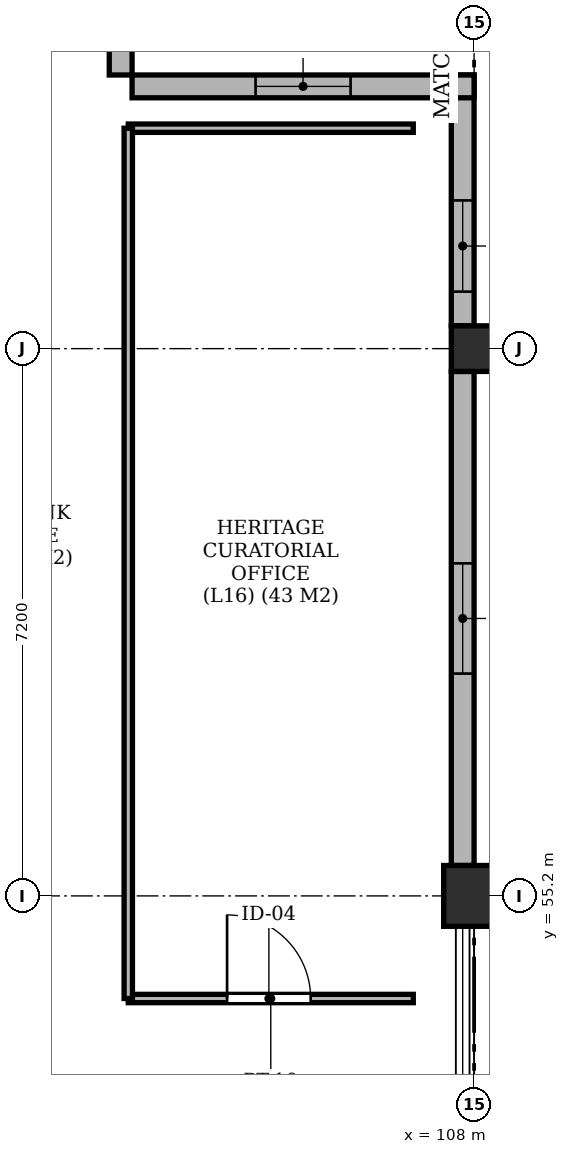
"""IFC4 building model, lengths in metres.
Left out: names, types, materials, properties, quantities, classifications, styles, units other than length and angle.
Written with IfcOpenShell. Run it as: python <this file> out.ifc"""

import sys

from ifc_helpers import new_model, si_unit, direction, frame, frame_2d, origin, origin_2d, place, context, subcontext, project, spatial, rectangle, extrude, element, fill, save


model = new_model("IFC4")
c1 = context("Model", 3, precision=1e-05, world=origin(), true_north=direction((0.0, 1.0)))
c2 = subcontext(c1, "Body", "Model", "MODEL_VIEW")
j1 = project(units=[si_unit("LENGTHUNIT", "METRE"), si_unit("PLANEANGLEUNIT", "RADIAN")], contexts=[c1])
p1 = place(None, origin())
s1 = spatial("IfcSite", under=j1, at=p1, CompositionType="ELEMENT")
p2 = place(p1, origin())
s2 = spatial("IfcBuilding", under=s1, at=p2, CompositionType="ELEMENT")
p3 = place(p2, frame((0.0, 0.0, 63.3)))
s3 = spatial("IfcBuildingStorey", under=s2, at=p3, CompositionType="ELEMENT", Elevation=63.3)
p4 = place(p3, frame((108.0, 55.2, -0.21), z_axis=(0.0, 0.0, 1.0), x_axis=(1.0, 0.0, 0.0)))
e1 = element("IfcColumn", 1, at=p4, inside=s3, PredefinedType="COLUMN", context=c2, shape_type="SweptSolid", body=[
    extrude(rectangle(XDim=0.8, YDim=0.8, at=origin_2d()), origin(), (0.0, 0.0, 1.0), 3.22),
])
p5 = place(p3, frame((108.0, 62.4, -0.21), z_axis=(0.0, 0.0, 1.0), x_axis=(1.0, 0.0, 0.0)))
e2 = element("IfcColumn", 2, at=p5, inside=s3, PredefinedType="COLUMN", context=c2, shape_type="SweptSolid", body=[
    extrude(rectangle(XDim=0.6, YDim=0.6, at=origin_2d()), origin(), (0.0, 0.0, 1.0), 3.22),
])
p6 = place(p3, frame((107.85, 55.6, 0.0), z_axis=(0.0, 0.0, 1.0), x_axis=(0.0, 1.0, 0.0)))
e3 = element("IfcWall", 3, at=p6, inside=s3, PredefinedType="SOLIDWALL", context=c2, shape_type="SweptSolid", body=[
    extrude(rectangle(XDim=6.5, YDim=0.3, at=frame_2d((3.25, 0.0))), origin(), (0.0, 0.0, 1.0), 2.53),
])
p7 = place(p6, frame((2.525, 0.0, 0.62)))
e4 = element("IfcOpeningElement", 4, at=p7, cuts=e3, PredefinedType="OPENING", context=c2, shape_type="SweptSolid", body=[
    extrude(rectangle(XDim=1.45, YDim=1.81, at=frame_2d((0.725, 0.905))), frame((0.0, 0.162, 0.0), z_axis=(0.0, -1.0, 0.0), x_axis=(1.0, 0.0, 0.0)), (0.0, 0.0, 1.0), 0.324),
])
p8 = place(p3, frame((107.85, 62.7, 0.0), z_axis=(0.0, 0.0, 1.0), x_axis=(0.0, 1.0, 0.0)))
e5 = element("IfcWall", 5, at=p8, inside=s3, PredefinedType="SOLIDWALL", context=c2, shape_type="SweptSolid", body=[
    extrude(rectangle(XDim=3.3, YDim=0.3, at=frame_2d((1.65, 0.0))), origin(), (0.0, 0.0, 1.0), 2.53),
])
p9 = place(p8, frame((0.45, 0.0, 0.62)))
e6 = element("IfcOpeningElement", 6, at=p9, cuts=e5, PredefinedType="OPENING", context=c2, shape_type="SweptSolid", body=[
    extrude(rectangle(XDim=1.2, YDim=1.65, at=frame_2d((0.6, 0.825))), frame((0.0, 0.162, 0.0), z_axis=(0.0, -1.0, 0.0), x_axis=(1.0, 0.0, 0.0)), (0.0, 0.0, 1.0), 0.324),
])
p10 = place(p3, frame((108.0, 65.85, 0.0), z_axis=(0.0, 0.0, 1.0), x_axis=(-1.0, 0.0, 0.0)))
e7 = element("IfcWall", 7, at=p10, inside=s3, PredefinedType="SOLIDWALL", context=c2, shape_type="SweptSolid", body=[
    extrude(rectangle(XDim=4.5, YDim=0.3, at=frame_2d((2.25, 0.0))), origin(), (0.0, 0.0, 1.0), 2.53),
])
p11 = place(p10, frame((1.625, 0.0, 0.62)))
e8 = element("IfcOpeningElement", 8, at=p11, cuts=e7, PredefinedType="OPENING", context=c2, shape_type="SweptSolid", body=[
    extrude(rectangle(XDim=1.25, YDim=1.75, at=frame_2d((0.625, 0.875))), frame((0.0, 0.162, 0.0), z_axis=(0.0, -1.0, 0.0), x_axis=(1.0, 0.0, 0.0)), (0.0, 0.0, 1.0), 0.324),
])
p12 = place(p3, frame((103.35, 66.0, 0.0), z_axis=(0.0, 0.0, 1.0), x_axis=(0.0, 1.0, 0.0)))
e9 = element("IfcWall", 9, at=p12, inside=s3, PredefinedType="SOLIDWALL", context=c2, shape_type="SweptSolid", body=[
    extrude(rectangle(XDim=3.6, YDim=0.3, at=frame_2d((1.8, 0.0))), origin(), (0.0, 0.0, 1.0), 2.53),
])
p13 = place(p3, frame((103.45, 53.85, 0.0), z_axis=(0.0, 0.0, 1.0), x_axis=(1.0, 0.0, 0.0)))
e10 = element("IfcWall", 10, at=p13, inside=s3, PredefinedType="PARTITIONING", context=c2, shape_type="SweptSolid", body=[
    extrude(rectangle(XDim=3.75, YDim=0.11, at=frame_2d((1.875, 0.0))), origin(), (0.0, 0.0, 1.0), 2.53),
])
p14 = place(p13, frame((1.3, 0.0, 0.0)))
e11 = element("IfcOpeningElement", 11, at=p14, cuts=e10, PredefinedType="OPENING", context=c2, shape_type="SweptSolid", body=[
    extrude(rectangle(XDim=1.1, YDim=2.15, at=frame_2d((0.55, 1.075))), frame((0.0, 0.067, 0.0), z_axis=(0.0, -1.0, 0.0), x_axis=(1.0, 0.0, 0.0)), (0.0, 0.0, 1.0), 0.134),
])
p15 = place(p3, frame((103.45, 65.3, 0.0), z_axis=(0.0, 0.0, 1.0), x_axis=(1.0, 0.0, 0.0)))
e12 = element("IfcWall", 12, at=p15, inside=s3, PredefinedType="PARTITIONING", context=c2, shape_type="SweptSolid", body=[
    extrude(rectangle(XDim=3.75, YDim=0.11, at=frame_2d((1.875, 0.0))), origin(), (0.0, 0.0, 1.0), 2.53),
])
p16 = place(p3, frame((103.45, 53.85, 0.0), z_axis=(0.0, 0.0, 1.0), x_axis=(0.0, 1.0, 0.0)))
e13 = element("IfcWall", 13, at=p16, inside=s3, PredefinedType="PARTITIONING", context=c2, shape_type="SweptSolid", body=[
    extrude(rectangle(XDim=11.45, YDim=0.11, at=frame_2d((5.725, 0.0))), origin(), (0.0, 0.0, 1.0), 2.53),
])
p17 = place(p7, origin())
e14 = element("IfcWindow", 14, at=p17, inside=s3, PartitioningType="SINGLE_PANEL", PredefinedType="WINDOW", context=c2, shape_type="SweptSolid", body=[
    extrude(rectangle(XDim=1.45, YDim=1.81, at=frame_2d((0.725, 0.905))), frame((0.0, 0.03, 0.0), z_axis=(0.0, -1.0, 0.0), x_axis=(1.0, 0.0, 0.0)), (0.0, 0.0, 1.0), 0.06),
])
fill(e4, e14)
p18 = place(p9, origin())
e15 = element("IfcWindow", 15, at=p18, inside=s3, PartitioningType="SINGLE_PANEL", PredefinedType="WINDOW", context=c2, shape_type="SweptSolid", body=[
    extrude(rectangle(XDim=1.2, YDim=1.65, at=frame_2d((0.6, 0.825))), frame((0.0, 0.03, 0.0), z_axis=(0.0, -1.0, 0.0), x_axis=(1.0, 0.0, 0.0)), (0.0, 0.0, 1.0), 0.06),
])
fill(e6, e15)
p19 = place(p11, origin())
e16 = element("IfcWindow", 16, at=p19, inside=s3, PartitioningType="SINGLE_PANEL", PredefinedType="WINDOW", context=c2, shape_type="SweptSolid", body=[
    extrude(rectangle(XDim=1.25, YDim=1.75, at=frame_2d((0.625, 0.875))), frame((0.0, 0.03, 0.0), z_axis=(0.0, -1.0, 0.0), x_axis=(1.0, 0.0, 0.0)), (0.0, 0.0, 1.0), 0.06),
])
fill(e8, e16)
p20 = place(p14, origin())
e17 = element("IfcDoor", 17, at=p20, inside=s3, OperationType="SINGLE_SWING_LEFT", PredefinedType="DOOR", context=c2, shape_type="SweptSolid", body=[
    extrude(rectangle(XDim=1.1, YDim=2.15, at=frame_2d((0.55, 1.075))), frame((0.0, 0.025, 0.0), z_axis=(0.0, -1.0, 0.0), x_axis=(1.0, 0.0, 0.0)), (0.0, 0.0, 1.0), 0.05),
])
fill(e11, e17)
save(model, sys.argv[1])
